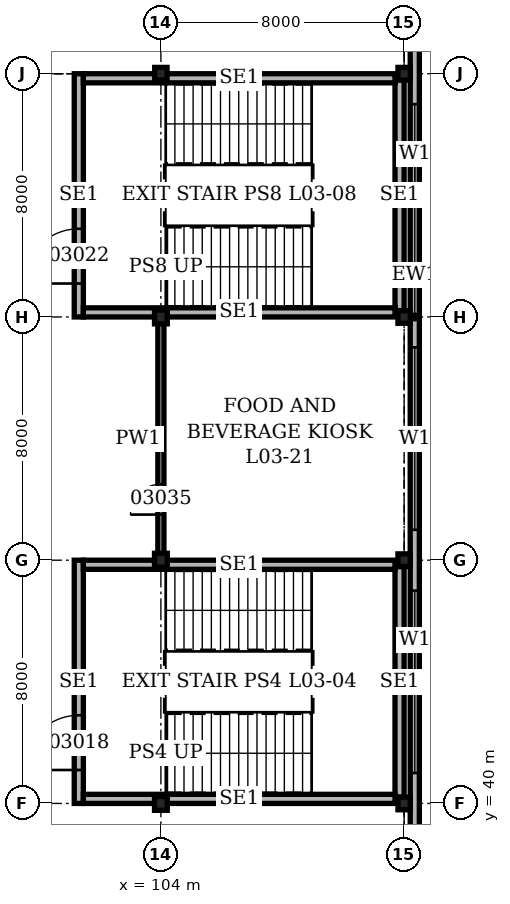
"""IFC4 building model, lengths in metres.
Left out: names, types, materials, properties, quantities, classifications, styles, units other than length and angle.
Written with IfcOpenShell. Run it as: python <this file> out.ifc"""

import sys

from ifc_helpers import new_model, si_unit, direction, frame, frame_2d, origin, origin_2d, place, context, subcontext, project, spatial, rectangle, i_section, extrude, element, fill, save


model = new_model("IFC4")
c1 = context("Model", 3, precision=1e-05, world=origin(), true_north=direction((0.0, 1.0)))
c2 = subcontext(c1, "Body", "Model", "MODEL_VIEW")
j1 = project(units=[si_unit("LENGTHUNIT", "METRE"), si_unit("PLANEANGLEUNIT", "RADIAN")], contexts=[c1])
p1 = place(None, origin())
s1 = spatial("IfcSite", under=j1, at=p1, CompositionType="ELEMENT")
p2 = place(p1, origin())
s2 = spatial("IfcBuilding", under=s1, at=p2, CompositionType="ELEMENT")
p3 = place(p2, frame((0.0, 0.0, 14.9)))
s3 = spatial("IfcBuildingStorey", under=s2, at=p3, CompositionType="ELEMENT", Elevation=14.9)
for number, where, z_axis, x_axis in (
    (1, (104.0, 40.0, 0.0), (0.0, 0.0, 1.0), (1.0, 0.0, 0.0)),
    (2, (104.0, 48.0, 0.0), (0.0, 0.0, 1.0), (1.0, 0.0, 0.0)),
    (3, (104.0, 56.0, 0.0), (0.0, 0.0, 1.0), (1.0, 0.0, 0.0)),
):
    element("IfcColumn", number, at=place(p3, frame(where, z_axis=z_axis, x_axis=x_axis)), inside=s3, PredefinedType="COLUMN", context=c2, shape_type="SweptSolid", body=[
        extrude(i_section(OverallWidth=0.419, OverallDepth=0.455, WebThickness=0.042, FlangeThickness=0.068, at=origin_2d()), origin(), (0.0, 0.0, 1.0), 5.0),
    ])
for number, where, z_axis, x_axis in (
    (4, (104.0, 64.0, 0.0), (0.0, 0.0, 1.0), (1.0, 0.0, 0.0)),
    (5, (112.0, 40.0, 0.0), (0.0, 0.0, 1.0), (1.0, 0.0, 0.0)),
    (6, (112.0, 48.0, 0.0), (0.0, 0.0, 1.0), (1.0, 0.0, 0.0)),
    (7, (112.0, 56.0, 0.0), (0.0, 0.0, 1.0), (1.0, 0.0, 0.0)),
    (8, (112.0, 64.0, 0.0), (0.0, 0.0, 1.0), (1.0, 0.0, 0.0)),
):
    element("IfcColumn", number, at=place(p3, frame(where, z_axis=z_axis, x_axis=x_axis)), inside=s3, PredefinedType="COLUMN", context=c2, shape_type="SweptSolid", body=[
        extrude(i_section(OverallWidth=0.406, OverallDepth=0.417, WebThickness=0.03, FlangeThickness=0.048, at=origin_2d()), origin(), (0.0, 0.0, 1.0), 5.0),
    ])
p4 = place(p3, frame((112.35, -0.35, 0.0), z_axis=(0.0, 0.0, 1.0), x_axis=(0.0, 1.0, 0.0)))
e9 = element("IfcWall", 9, at=p4, inside=s3, PredefinedType="SOLIDWALL", context=c2, shape_type="SweptSolid", body=[
    extrude(rectangle(XDim=112.7, YDim=0.3, at=frame_2d((56.35, 0.0))), origin(), (0.0, 0.0, 1.0), 5.0),
])
p5 = place(p4, frame((1.35, 0.0, 1.0)))
e10 = element("IfcOpeningElement", 10, at=p5, cuts=e9, PredefinedType="OPENING", context=c2, shape_type="SweptSolid", body=[
    extrude(rectangle(XDim=6.0, YDim=1.5, at=frame_2d((3.0, 0.75))), frame((0.0, 0.16, 0.0), z_axis=(0.0, -1.0, 0.0), x_axis=(1.0, 0.0, 0.0)), (0.0, 0.0, 1.0), 0.32),
])
p6 = place(p4, frame((9.35, 0.0, 1.0)))
e11 = element("IfcOpeningElement", 11, at=p6, cuts=e9, PredefinedType="OPENING", context=c2, shape_type="SweptSolid", body=[
    extrude(rectangle(XDim=6.0, YDim=1.5, at=frame_2d((3.0, 0.75))), frame((0.0, 0.16, 0.0), z_axis=(0.0, -1.0, 0.0), x_axis=(1.0, 0.0, 0.0)), (0.0, 0.0, 1.0), 0.32),
])
p7 = place(p4, frame((17.35, 0.0, 1.0)))
e12 = element("IfcOpeningElement", 12, at=p7, cuts=e9, PredefinedType="OPENING", context=c2, shape_type="SweptSolid", body=[
    extrude(rectangle(XDim=6.0, YDim=1.5, at=frame_2d((3.0, 0.75))), frame((0.0, 0.16, 0.0), z_axis=(0.0, -1.0, 0.0), x_axis=(1.0, 0.0, 0.0)), (0.0, 0.0, 1.0), 0.32),
])
p8 = place(p4, frame((25.35, 0.0, 1.0)))
e13 = element("IfcOpeningElement", 13, at=p8, cuts=e9, PredefinedType="OPENING", context=c2, shape_type="SweptSolid", body=[
    extrude(rectangle(XDim=6.0, YDim=1.5, at=frame_2d((3.0, 0.75))), frame((0.0, 0.16, 0.0), z_axis=(0.0, -1.0, 0.0), x_axis=(1.0, 0.0, 0.0)), (0.0, 0.0, 1.0), 0.32),
])
p9 = place(p4, frame((33.35, 0.0, 1.0)))
e14 = element("IfcOpeningElement", 14, at=p9, cuts=e9, PredefinedType="OPENING", context=c2, shape_type="SweptSolid", body=[
    extrude(rectangle(XDim=6.0, YDim=1.5, at=frame_2d((3.0, 0.75))), frame((0.0, 0.16, 0.0), z_axis=(0.0, -1.0, 0.0), x_axis=(1.0, 0.0, 0.0)), (0.0, 0.0, 1.0), 0.32),
])
p10 = place(p4, frame((41.35, 0.0, 1.0)))
e15 = element("IfcOpeningElement", 15, at=p10, cuts=e9, PredefinedType="OPENING", context=c2, shape_type="SweptSolid", body=[
    extrude(rectangle(XDim=6.0, YDim=1.5, at=frame_2d((3.0, 0.75))), frame((0.0, 0.16, 0.0), z_axis=(0.0, -1.0, 0.0), x_axis=(1.0, 0.0, 0.0)), (0.0, 0.0, 1.0), 0.32),
])
p11 = place(p4, frame((49.35, 0.0, 1.0)))
e16 = element("IfcOpeningElement", 16, at=p11, cuts=e9, PredefinedType="OPENING", context=c2, shape_type="SweptSolid", body=[
    extrude(rectangle(XDim=6.0, YDim=1.5, at=frame_2d((3.0, 0.75))), frame((0.0, 0.16, 0.0), z_axis=(0.0, -1.0, 0.0), x_axis=(1.0, 0.0, 0.0)), (0.0, 0.0, 1.0), 0.32),
])
p12 = place(p4, frame((57.35, 0.0, 1.0)))
e17 = element("IfcOpeningElement", 17, at=p12, cuts=e9, PredefinedType="OPENING", context=c2, shape_type="SweptSolid", body=[
    extrude(rectangle(XDim=6.0, YDim=1.5, at=frame_2d((3.0, 0.75))), frame((0.0, 0.16, 0.0), z_axis=(0.0, -1.0, 0.0), x_axis=(1.0, 0.0, 0.0)), (0.0, 0.0, 1.0), 0.32),
])
p13 = place(p4, frame((65.35, 0.0, 1.0)))
e18 = element("IfcOpeningElement", 18, at=p13, cuts=e9, PredefinedType="OPENING", context=c2, shape_type="SweptSolid", body=[
    extrude(rectangle(XDim=6.0, YDim=1.5, at=frame_2d((3.0, 0.75))), frame((0.0, 0.16, 0.0), z_axis=(0.0, -1.0, 0.0), x_axis=(1.0, 0.0, 0.0)), (0.0, 0.0, 1.0), 0.32),
])
p14 = place(p4, frame((73.35, 0.0, 1.0)))
e19 = element("IfcOpeningElement", 19, at=p14, cuts=e9, PredefinedType="OPENING", context=c2, shape_type="SweptSolid", body=[
    extrude(rectangle(XDim=6.0, YDim=1.5, at=frame_2d((3.0, 0.75))), frame((0.0, 0.16, 0.0), z_axis=(0.0, -1.0, 0.0), x_axis=(1.0, 0.0, 0.0)), (0.0, 0.0, 1.0), 0.32),
])
p15 = place(p4, frame((81.35, 0.0, 1.0)))
e20 = element("IfcOpeningElement", 20, at=p15, cuts=e9, PredefinedType="OPENING", context=c2, shape_type="SweptSolid", body=[
    extrude(rectangle(XDim=6.0, YDim=1.5, at=frame_2d((3.0, 0.75))), frame((0.0, 0.16, 0.0), z_axis=(0.0, -1.0, 0.0), x_axis=(1.0, 0.0, 0.0)), (0.0, 0.0, 1.0), 0.32),
])
p16 = place(p4, frame((89.35, 0.0, 1.0)))
e21 = element("IfcOpeningElement", 21, at=p16, cuts=e9, PredefinedType="OPENING", context=c2, shape_type="SweptSolid", body=[
    extrude(rectangle(XDim=6.0, YDim=1.5, at=frame_2d((3.0, 0.75))), frame((0.0, 0.16, 0.0), z_axis=(0.0, -1.0, 0.0), x_axis=(1.0, 0.0, 0.0)), (0.0, 0.0, 1.0), 0.32),
])
p17 = place(p4, frame((97.35, 0.0, 1.0)))
e22 = element("IfcOpeningElement", 22, at=p17, cuts=e9, PredefinedType="OPENING", context=c2, shape_type="SweptSolid", body=[
    extrude(rectangle(XDim=6.0, YDim=1.5, at=frame_2d((3.0, 0.75))), frame((0.0, 0.16, 0.0), z_axis=(0.0, -1.0, 0.0), x_axis=(1.0, 0.0, 0.0)), (0.0, 0.0, 1.0), 0.32),
])
p18 = place(p4, frame((105.35, 0.0, 1.0)))
e23 = element("IfcOpeningElement", 23, at=p18, cuts=e9, PredefinedType="OPENING", context=c2, shape_type="SweptSolid", body=[
    extrude(rectangle(XDim=6.0, YDim=1.5, at=frame_2d((3.0, 0.75))), frame((0.0, 0.16, 0.0), z_axis=(0.0, -1.0, 0.0), x_axis=(1.0, 0.0, 0.0)), (0.0, 0.0, 1.0), 0.32),
])
p19 = place(p3, frame((101.3, 40.0, 0.0), z_axis=(0.0, 0.0, 1.0), x_axis=(0.0, 1.0, 0.0)))
e24 = element("IfcWall", 24, at=p19, inside=s3, PredefinedType="SOLIDWALL", context=c2, shape_type="SweptSolid", body=[
    extrude(rectangle(XDim=8.0, YDim=0.3, at=frame_2d((4.0, 0.0))), origin(), (0.0, 0.0, 1.0), 4.8),
])
p20 = place(p19, frame((1.1, 0.0, 0.0)))
e25 = element("IfcOpeningElement", 25, at=p20, cuts=e24, PredefinedType="OPENING", context=c2, shape_type="SweptSolid", body=[
    extrude(rectangle(XDim=1.8, YDim=2.1, at=frame_2d((0.9, 1.05))), frame((0.0, 0.16, 0.0), z_axis=(0.0, -1.0, 0.0), x_axis=(1.0, 0.0, 0.0)), (0.0, 0.0, 1.0), 0.32),
])
p21 = place(p3, frame((111.85, 40.208, 0.0), z_axis=(0.0, 0.0, 1.0), x_axis=(0.0, 1.0, 0.0)))
e26 = element("IfcWall", 26, at=p21, inside=s3, PredefinedType="SOLIDWALL", context=c2, shape_type="SweptSolid", body=[
    extrude(rectangle(XDim=7.583, YDim=0.3, at=frame_2d((3.792, 0.0))), origin(), (0.0, 0.0, 1.0), 4.8),
])
for number, where, z_axis, x_axis in (
    (27, (101.45, 40.15, 0.0), (0.0, 0.0, 1.0), (1.0, 0.0, 0.0)),
    (28, (101.45, 47.85, 0.0), (0.0, 0.0, 1.0), (1.0, 0.0, 0.0)),
):
    element("IfcWall", number, at=place(p3, frame(where, z_axis=z_axis, x_axis=x_axis)), inside=s3, PredefinedType="SOLIDWALL", context=c2, shape_type="SweptSolid", body=[
        extrude(rectangle(XDim=10.25, YDim=0.3, at=frame_2d((5.125, 0.0))), origin(), (0.0, 0.0, 1.0), 4.8),
    ])
p22 = place(p3, frame((101.3, 56.0, 0.0), z_axis=(0.0, 0.0, 1.0), x_axis=(0.0, 1.0, 0.0)))
e29 = element("IfcWall", 29, at=p22, inside=s3, PredefinedType="SOLIDWALL", context=c2, shape_type="SweptSolid", body=[
    extrude(rectangle(XDim=8.0, YDim=0.3, at=frame_2d((4.0, 0.0))), origin(), (0.0, 0.0, 1.0), 4.8),
])
p23 = place(p22, frame((1.1, 0.0, 0.0)))
e30 = element("IfcOpeningElement", 30, at=p23, cuts=e29, PredefinedType="OPENING", context=c2, shape_type="SweptSolid", body=[
    extrude(rectangle(XDim=1.8, YDim=2.1, at=frame_2d((0.9, 1.05))), frame((0.0, 0.16, 0.0), z_axis=(0.0, -1.0, 0.0), x_axis=(1.0, 0.0, 0.0)), (0.0, 0.0, 1.0), 0.32),
])
p24 = place(p3, frame((111.85, 56.208, 0.0), z_axis=(0.0, 0.0, 1.0), x_axis=(0.0, 1.0, 0.0)))
e31 = element("IfcWall", 31, at=p24, inside=s3, PredefinedType="SOLIDWALL", context=c2, shape_type="SweptSolid", body=[
    extrude(rectangle(XDim=7.583, YDim=0.3, at=frame_2d((3.792, 0.0))), origin(), (0.0, 0.0, 1.0), 4.8),
])
for number, where, z_axis, x_axis in (
    (32, (101.45, 56.15, 0.0), (0.0, 0.0, 1.0), (1.0, 0.0, 0.0)),
    (33, (101.45, 63.85, 0.0), (0.0, 0.0, 1.0), (1.0, 0.0, 0.0)),
):
    element("IfcWall", number, at=place(p3, frame(where, z_axis=z_axis, x_axis=x_axis)), inside=s3, PredefinedType="SOLIDWALL", context=c2, shape_type="SweptSolid", body=[
        extrude(rectangle(XDim=10.25, YDim=0.3, at=frame_2d((5.125, 0.0))), origin(), (0.0, 0.0, 1.0), 4.8),
    ])
p25 = place(p3, frame((104.0, 48.1, 0.0), z_axis=(0.0, 0.0, 1.0), x_axis=(0.0, 1.0, 0.0)))
e34 = element("IfcWall", 34, at=p25, inside=s3, PredefinedType="PARTITIONING", context=c2, shape_type="SweptSolid", body=[
    extrude(rectangle(XDim=7.8, YDim=0.2, at=frame_2d((3.9, 0.0))), origin(), (0.0, 0.0, 1.0), 4.028),
])
p26 = place(p25, frame((1.4, 0.0, 0.0)))
e35 = element("IfcOpeningElement", 35, at=p26, cuts=e34, PredefinedType="OPENING", context=c2, shape_type="SweptSolid", body=[
    extrude(rectangle(XDim=1.0, YDim=2.1, at=frame_2d((0.5, 1.05))), frame((0.0, 0.11, 0.0), z_axis=(0.0, -1.0, 0.0), x_axis=(1.0, 0.0, 0.0)), (0.0, 0.0, 1.0), 0.22),
])
p27 = place(p10, origin())
e36 = element("IfcWindow", 36, at=p27, inside=s3, PartitioningType="SINGLE_PANEL", PredefinedType="WINDOW", context=c2, shape_type="SweptSolid", body=[
    extrude(rectangle(XDim=6.0, YDim=1.5, at=frame_2d((3.0, 0.75))), frame((0.0, 0.03, 0.0), z_axis=(0.0, -1.0, 0.0), x_axis=(1.0, 0.0, 0.0)), (0.0, 0.0, 1.0), 0.06),
])
fill(e15, e36)
p28 = place(p11, origin())
e37 = element("IfcWindow", 37, at=p28, inside=s3, PartitioningType="SINGLE_PANEL", PredefinedType="WINDOW", context=c2, shape_type="SweptSolid", body=[
    extrude(rectangle(XDim=6.0, YDim=1.5, at=frame_2d((3.0, 0.75))), frame((0.0, 0.03, 0.0), z_axis=(0.0, -1.0, 0.0), x_axis=(1.0, 0.0, 0.0)), (0.0, 0.0, 1.0), 0.06),
])
fill(e16, e37)
p29 = place(p12, origin())
e38 = element("IfcWindow", 38, at=p29, inside=s3, PartitioningType="SINGLE_PANEL", PredefinedType="WINDOW", context=c2, shape_type="SweptSolid", body=[
    extrude(rectangle(XDim=6.0, YDim=1.5, at=frame_2d((3.0, 0.75))), frame((0.0, 0.03, 0.0), z_axis=(0.0, -1.0, 0.0), x_axis=(1.0, 0.0, 0.0)), (0.0, 0.0, 1.0), 0.06),
])
fill(e17, e38)
p30 = place(p20, origin())
e39 = element("IfcDoor", 39, at=p30, inside=s3, OperationType="DOUBLE_DOOR_SINGLE_SWING", PredefinedType="DOOR", context=c2, shape_type="SweptSolid", body=[
    extrude(rectangle(XDim=1.8, YDim=2.1, at=frame_2d((0.9, 1.05))), frame((0.0, 0.15, 0.0), z_axis=(0.0, -1.0, 0.0), x_axis=(1.0, 0.0, 0.0)), (0.0, 0.0, 1.0), 0.3),
])
fill(e25, e39)
p31 = place(p23, origin())
e40 = element("IfcDoor", 40, at=p31, inside=s3, OperationType="DOUBLE_DOOR_SINGLE_SWING", PredefinedType="DOOR", context=c2, shape_type="SweptSolid", body=[
    extrude(rectangle(XDim=1.8, YDim=2.1, at=frame_2d((0.9, 1.05))), frame((0.0, 0.15, 0.0), z_axis=(0.0, -1.0, 0.0), x_axis=(1.0, 0.0, 0.0)), (0.0, 0.0, 1.0), 0.3),
])
fill(e30, e40)
p32 = place(p26, origin())
e41 = element("IfcDoor", 41, at=p32, inside=s3, OperationType="SINGLE_SWING_LEFT", PredefinedType="DOOR", context=c2, shape_type="SweptSolid", body=[
    extrude(rectangle(XDim=1.0, YDim=2.1, at=frame_2d((0.5, 1.05))), frame((0.0, 0.1, 0.0), z_axis=(0.0, -1.0, 0.0), x_axis=(1.0, 0.0, 0.0)), (0.0, 0.0, 1.0), 0.199),
])
fill(e35, e41)
save(model, sys.argv[1])
